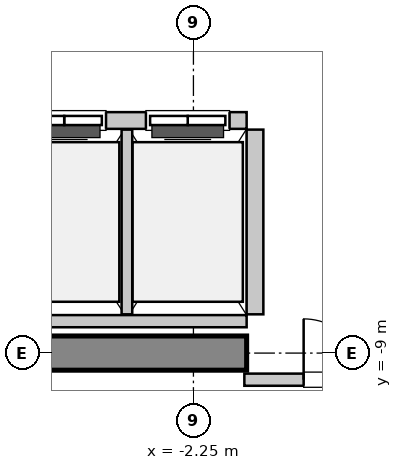
"""IFC4 building model, lengths in metres.
Left out: names, types, materials, properties, quantities, classifications, styles, units other than length and angle.
Written with IfcOpenShell. Run it as: python <this file> out.ifc"""

import sys

from ifc_helpers import new_model, si_unit, direction, frame, frame_2d, origin, place, context, subcontext, project, spatial, rectangle, extrude, source, transform, mapped, element, fill, save


model = new_model("IFC4")
c1 = context("Model", 3, precision=1e-05, world=origin(), true_north=direction((0.0, 1.0)))
c2 = subcontext(c1, "Body", "Model", "MODEL_VIEW")
j1 = project(units=[si_unit("LENGTHUNIT", "METRE"), si_unit("PLANEANGLEUNIT", "RADIAN")], contexts=[c1])
p1 = place(None, origin())
s1 = spatial("IfcSite", under=j1, at=p1, CompositionType="ELEMENT")
p2 = place(p1, origin())
s2 = spatial("IfcBuilding", under=s1, at=p2, CompositionType="ELEMENT")
p3 = place(p2, frame((0.0, 0.0, 225.6)))
s3 = spatial("IfcBuildingStorey", under=s2, at=p3, CompositionType="ELEMENT", Elevation=225.6)
m1 = source(origin(), c2, "Body", "SweptSolid", [
    extrude(rectangle(XDim=9.925, YDim=0.45, at=frame_2d((4.962, 0.0))), origin(), (0.0, 0.0, 1.0), 3.8),
])
p4 = place(p3, frame((-11.475, -9.0, 0.0), z_axis=(0.0, 0.0, 1.0), x_axis=(1.0, 0.0, 0.0)))
e1 = element("IfcWall", 1, at=p4, inside=s3, PredefinedType="SHEAR", context=c2, shape_type="MappedRepresentation", body=[
    mapped(m1, transform((0.0, 0.0, 0.0), x_axis=(1.0, 0.0, 0.0), y_axis=(0.0, 1.0, 0.0), z_axis=(0.0, 0.0, 1.0), scale=1.0)),
])
m2 = source(origin(), c2, "Body", "SweptSolid", [
    extrude(rectangle(XDim=3.2, YDim=0.22, at=frame_2d((1.6, 0.0))), origin(), (0.0, 0.0, 1.0), 3.535),
])
p5 = place(p3, frame((-1.55, -5.94, 0.0), z_axis=(0.0, 0.0, 1.0), x_axis=(-1.0, 0.0, 0.0)))
e2 = element("IfcWall", 2, at=p5, inside=s3, PredefinedType="SOLIDWALL", context=c2, shape_type="MappedRepresentation", body=[
    mapped(m2, transform((0.0, 0.0, 0.0), x_axis=(1.0, 0.0, 0.0), y_axis=(0.0, 1.0, 0.0), z_axis=(0.0, 0.0, 1.0), scale=1.0)),
])
p6 = place(p5, frame((1.85, 0.0, 0.0)))
e3 = element("IfcOpeningElement", 3, at=p6, cuts=e2, PredefinedType="OPENING", context=c2, shape_type="SweptSolid", body=[
    extrude(rectangle(XDim=1.1, YDim=2.2, at=frame_2d((0.55, 1.1))), frame((0.0, 0.12, 0.0), z_axis=(0.0, -1.0, 0.0), x_axis=(1.0, 0.0, 0.0)), (0.0, 0.0, 1.0), 0.24),
])
p7 = place(p5, frame((0.225, 0.0, 0.0)))
e4 = element("IfcOpeningElement", 4, at=p7, cuts=e2, PredefinedType="OPENING", context=c2, shape_type="SweptSolid", body=[
    extrude(rectangle(XDim=1.1, YDim=2.2, at=frame_2d((0.55, 1.1))), frame((0.0, 0.12, 0.0), z_axis=(0.0, -1.0, 0.0), x_axis=(1.0, 0.0, 0.0)), (0.0, 0.0, 1.0), 0.24),
])
m3 = source(origin(), c2, "Body", "SweptSolid", [
    extrude(rectangle(XDim=3.2, YDim=0.16, at=frame_2d((1.6, 0.0))), origin(), (0.0, 0.0, 1.0), 2.625),
])
p8 = place(p3, frame((-4.75, -8.58, 0.0), z_axis=(0.0, 0.0, 1.0), x_axis=(1.0, 0.0, 0.0)))
e5 = element("IfcWall", 5, at=p8, inside=s3, PredefinedType="PARTITIONING", context=c2, shape_type="MappedRepresentation", body=[
    mapped(m3, transform((0.0, 0.0, 0.0), x_axis=(1.0, 0.0, 0.0), y_axis=(0.0, 1.0, 0.0), z_axis=(0.0, 0.0, 1.0), scale=1.0)),
])
m4 = source(origin(), c2, "Body", "SweptSolid", [
    extrude(rectangle(XDim=2.43, YDim=0.14, at=frame_2d((1.215, 0.0))), origin(), (0.0, 0.0, 1.0), 3.535),
])
p9 = place(p3, frame((-3.125, -8.49, 0.0), z_axis=(0.0, 0.0, 1.0), x_axis=(0.0, 1.0, 0.0)))
e6 = element("IfcWall", 6, at=p9, inside=s3, PredefinedType="PARTITIONING", context=c2, shape_type="MappedRepresentation", body=[
    mapped(m4, transform((0.0, 0.0, 0.0), x_axis=(1.0, 0.0, 0.0), y_axis=(0.0, 1.0, 0.0), z_axis=(0.0, 0.0, 1.0), scale=1.0)),
])
m5 = source(origin(), c2, "Body", "SweptSolid", [
    extrude(rectangle(XDim=2.43, YDim=0.22, at=frame_2d((1.215, 0.0))), origin(), (0.0, 0.0, 1.0), 3.535),
])
p10 = place(p3, frame((-1.44, -8.49, 0.0), z_axis=(0.0, 0.0, 1.0), x_axis=(0.0, 1.0, 0.0)))
e7 = element("IfcWall", 7, at=p10, inside=s3, PredefinedType="SOLIDWALL", context=c2, shape_type="MappedRepresentation", body=[
    mapped(m5, transform((0.0, 0.0, 0.0), x_axis=(1.0, 0.0, 0.0), y_axis=(0.0, 1.0, 0.0), z_axis=(0.0, 0.0, 1.0), scale=1.0)),
])
m6 = source(origin(), c2, "Body", "SweptSolid", [
    extrude(rectangle(XDim=3.16, YDim=0.16, at=frame_2d((1.58, 0.0))), origin(), (0.0, 0.0, 1.0), 2.625),
])
p11 = place(p3, frame((-1.58, -9.35, 0.0), z_axis=(0.0, 0.0, 1.0), x_axis=(1.0, 0.0, 0.0)))
e8 = element("IfcWall", 8, at=p11, inside=s3, PredefinedType="PARTITIONING", context=c2, shape_type="MappedRepresentation", body=[
    mapped(m6, transform((0.0, 0.0, 0.0), x_axis=(1.0, 0.0, 0.0), y_axis=(0.0, 1.0, 0.0), z_axis=(0.0, 0.0, 1.0), scale=1.0)),
])
p12 = place(p11, frame((0.78, 0.0, 0.0)))
e9 = element("IfcOpeningElement", 9, at=p12, cuts=e8, PredefinedType="OPENING", context=c2, shape_type="SweptSolid", body=[
    extrude(rectangle(XDim=1.6, YDim=2.3, at=frame_2d((0.8, 1.15))), frame((0.0, 0.09, 0.0), z_axis=(0.0, -1.0, 0.0), x_axis=(1.0, 0.0, 0.0)), (0.0, 0.0, 1.0), 0.18),
])
m7 = source(origin(), c2, "Body", "SweptSolid", [
    extrude(rectangle(XDim=1.1, YDim=2.2, at=frame_2d((0.55, 1.1))), frame((0.0, 0.025, 0.0), z_axis=(0.0, -1.0, 0.0), x_axis=(1.0, 0.0, 0.0)), (0.0, 0.0, 1.0), 0.05),
])
p13 = place(p6, origin())
e10 = element("IfcDoor", 10, at=p13, inside=s3, OperationType="DOUBLE_DOOR_SLIDING", PredefinedType="DOOR", context=c2, shape_type="MappedRepresentation", body=[
    mapped(m7, transform((0.0, 0.0, 0.0), x_axis=(1.0, 0.0, 0.0), y_axis=(0.0, 1.0, 0.0), z_axis=(0.0, 0.0, 1.0), scale=1.0)),
])
fill(e3, e10)
p14 = place(p7, origin())
e11 = element("IfcDoor", 11, at=p14, inside=s3, OperationType="DOUBLE_DOOR_SLIDING", PredefinedType="DOOR", context=c2, shape_type="MappedRepresentation", body=[
    mapped(m7, transform((0.0, 0.0, 0.0), x_axis=(1.0, 0.0, 0.0), y_axis=(0.0, 1.0, 0.0), z_axis=(0.0, 0.0, 1.0), scale=1.0)),
])
fill(e4, e11)
m8 = source(origin(), c2, "Body", "SweptSolid", [
    extrude(rectangle(XDim=1.6, YDim=2.3, at=frame_2d((0.8, 1.15))), frame((0.0, 0.025, 0.0), z_axis=(0.0, -1.0, 0.0), x_axis=(1.0, 0.0, 0.0)), (0.0, 0.0, 1.0), 0.05),
])
p15 = place(p12, origin())
e12 = element("IfcDoor", 12, at=p15, inside=s3, OperationType="DOUBLE_DOOR_SINGLE_SWING", PredefinedType="DOOR", context=c2, shape_type="MappedRepresentation", body=[
    mapped(m8, transform((0.0, 0.0, 0.0), x_axis=(1.0, 0.0, 0.0), y_axis=(0.0, 1.0, 0.0), z_axis=(0.0, 0.0, 1.0), scale=1.0)),
])
fill(e9, e12)
save(model, sys.argv[1])
